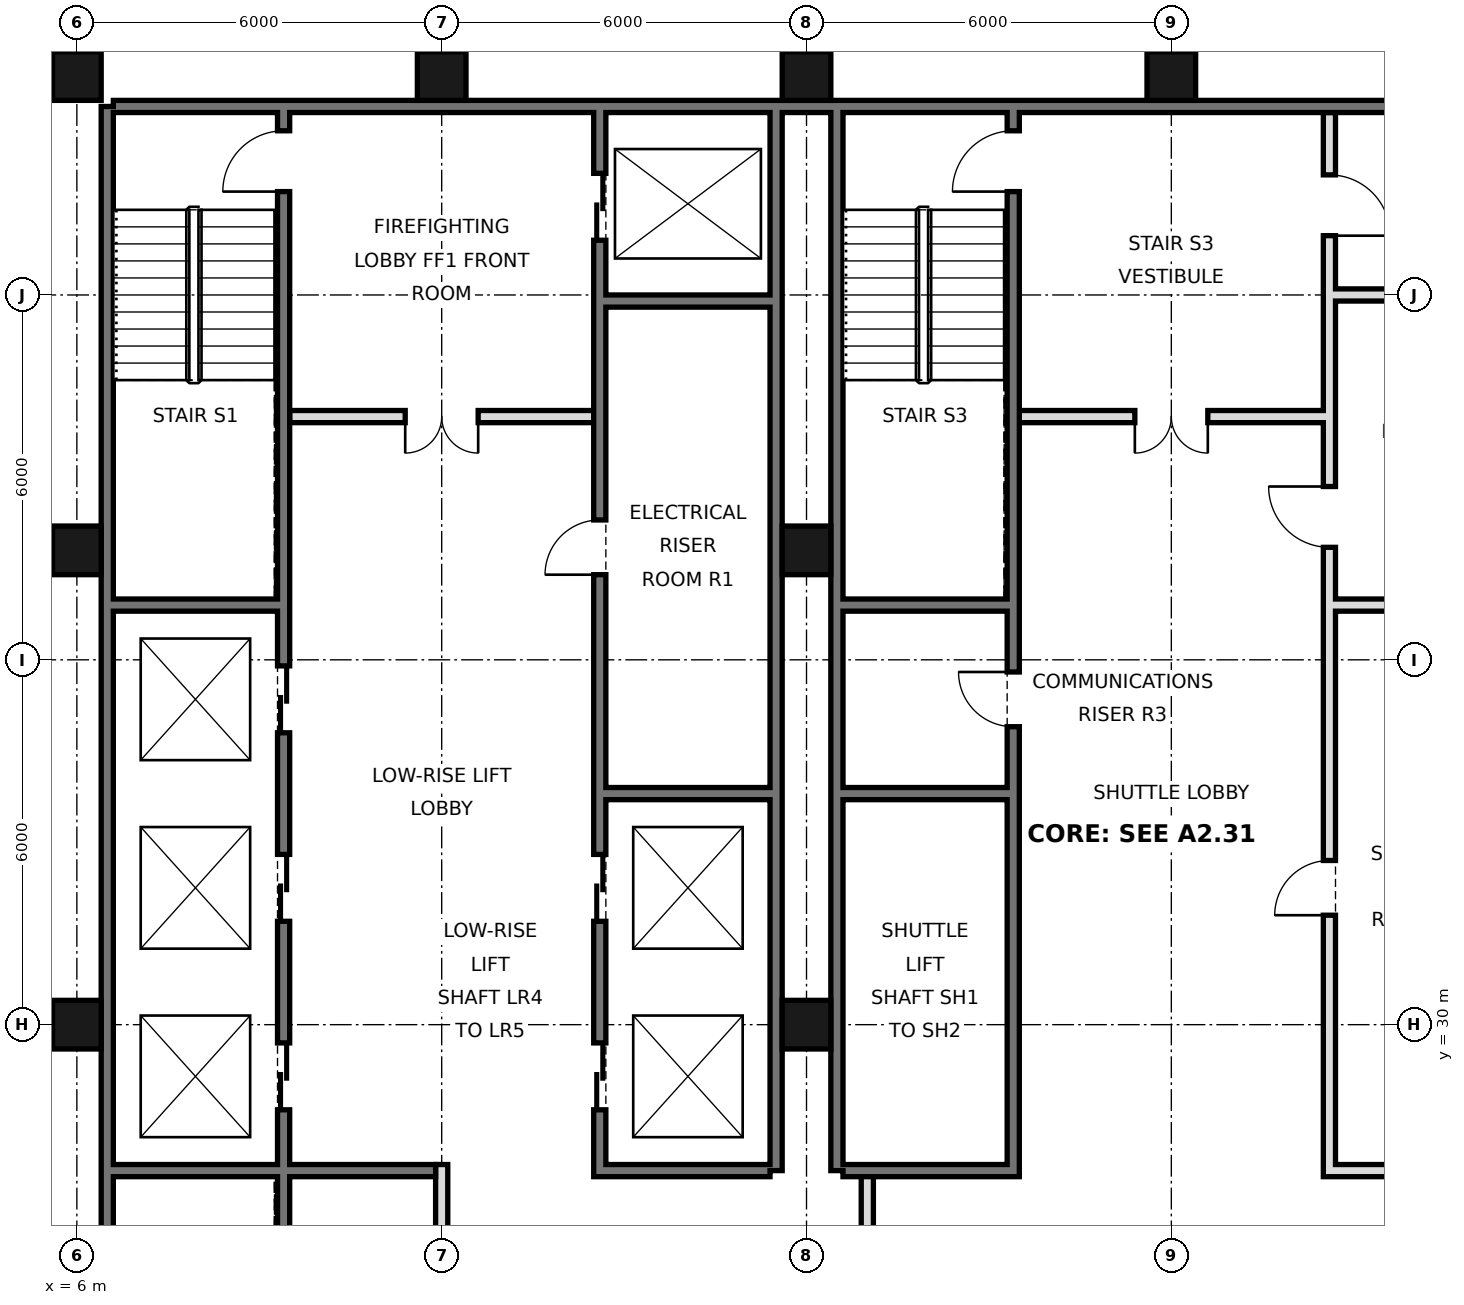
"""IFC4 building model, lengths in metres.
Left out: names, types, materials, properties, quantities, classifications, styles, units other than length and angle.
Written with IfcOpenShell. Run it as: python <this file> out.ifc"""

import sys

from ifc_helpers import new_model, si_unit, direction, frame, frame_2d, origin, origin_2d, place, context, subcontext, project, spatial, rectangle, hollow_rectangle, extrude, element, fill, save


model = new_model("IFC4")
c1 = context("Model", 3, precision=1e-05, world=origin(), true_north=direction((0.0, 1.0)))
c2 = subcontext(c1, "Body", "Model", "MODEL_VIEW")
j1 = project(units=[si_unit("LENGTHUNIT", "METRE"), si_unit("PLANEANGLEUNIT", "RADIAN")], contexts=[c1])
p1 = place(None, origin())
s1 = spatial("IfcSite", under=j1, at=p1, CompositionType="ELEMENT")
p2 = place(p1, origin())
s2 = spatial("IfcBuilding", under=s1, at=p2, CompositionType="ELEMENT")
p3 = place(p2, frame((0.0, 0.0, 123.2)))
s3 = spatial("IfcBuildingStorey", under=s2, at=p3, CompositionType="ELEMENT", Elevation=123.2)
for number, where, z_axis, x_axis in (
    (1, (6.0, 30.0, 0.0), (0.0, 0.0, 1.0), (1.0, 0.0, 0.0)),
    (2, (6.0, 37.8, 0.0), (0.0, 0.0, 1.0), (1.0, 0.0, 0.0)),
    (3, (6.0, 45.6, 0.0), (0.0, 0.0, 1.0), (1.0, 0.0, 0.0)),
    (4, (12.0, 45.6, 0.0), (0.0, 0.0, 1.0), (1.0, 0.0, 0.0)),
    (5, (18.0, 30.0, 0.0), (0.0, 0.0, 1.0), (1.0, 0.0, 0.0)),
    (6, (18.0, 37.8, 0.0), (0.0, 0.0, 1.0), (1.0, 0.0, 0.0)),
    (7, (18.0, 45.6, 0.0), (0.0, 0.0, 1.0), (1.0, 0.0, 0.0)),
    (8, (24.0, 45.6, 0.0), (0.0, 0.0, 1.0), (1.0, 0.0, 0.0)),
):
    element("IfcColumn", number, at=place(p3, frame(where, z_axis=z_axis, x_axis=x_axis)), inside=s3, PredefinedType="COLUMN", context=c2, shape_type="SweptSolid", body=[
        extrude(hollow_rectangle(XDim=0.8, YDim=0.8, WallThickness=0.05, at=origin_2d()), origin(), (0.0, 0.0, 1.0), 3.6),
    ])
p4 = place(p3, frame((6.5, 21.6, 0.0), z_axis=(0.0, 0.0, 1.0), x_axis=(0.0, 1.0, 0.0)))
e9 = element("IfcWall", 9, at=p4, inside=s3, PredefinedType="SOLIDWALL", context=c2, shape_type="SweptSolid", body=[
    extrude(rectangle(XDim=23.5, YDim=0.2, at=frame_2d((11.75, 0.0))), origin(), (0.0, 0.0, 1.0), 3.42),
])
p5 = place(p3, frame((6.6, 45.1, 0.0), z_axis=(0.0, 0.0, 1.0), x_axis=(1.0, 0.0, 0.0)))
e10 = element("IfcWall", 10, at=p5, inside=s3, PredefinedType="SOLIDWALL", context=c2, shape_type="SweptSolid", body=[
    extrude(rectangle(XDim=34.8, YDim=0.2, at=frame_2d((17.4, 0.0))), origin(), (0.0, 0.0, 1.0), 3.42),
])
for number, where, z_axis, x_axis in (
    (11, (17.5, 27.6, 0.0), (0.0, 0.0, 1.0), (0.0, 1.0, 0.0)),
    (12, (18.5, 27.6, 0.0), (0.0, 0.0, 1.0), (0.0, 1.0, 0.0)),
):
    element("IfcWall", number, at=place(p3, frame(where, z_axis=z_axis, x_axis=x_axis)), inside=s3, PredefinedType="SOLIDWALL", context=c2, shape_type="SweptSolid", body=[
        extrude(rectangle(XDim=17.5, YDim=0.2, at=frame_2d((8.75, 0.0))), origin(), (0.0, 0.0, 1.0), 3.42),
    ])
p6 = place(p3, frame((19.0, 21.6, 0.0), z_axis=(0.0, 0.0, 1.0), x_axis=(0.0, 1.0, 0.0)))
e13 = element("IfcWall", 13, at=p6, inside=s3, PredefinedType="PARTITIONING", context=c2, shape_type="SweptSolid", body=[
    extrude(rectangle(XDim=6.0, YDim=0.2, at=frame_2d((3.0, 0.0))), origin(), (0.0, 0.0, 1.0), 3.42),
])
p7 = place(p6, frame((2.1, 0.0, 0.0)))
e14 = element("IfcOpeningElement", 14, at=p7, cuts=e13, PredefinedType="OPENING", context=c2, shape_type="SweptSolid", body=[
    extrude(rectangle(XDim=1.8, YDim=2.1, at=frame_2d((0.9, 1.05))), frame((0.0, 0.11, 0.0), z_axis=(0.0, -1.0, 0.0), x_axis=(1.0, 0.0, 0.0)), (0.0, 0.0, 1.0), 0.22),
])
p8 = place(p3, frame((12.0, 21.6, 0.0), z_axis=(0.0, 0.0, 1.0), x_axis=(0.0, 1.0, 0.0)))
e15 = element("IfcWall", 15, at=p8, inside=s3, PredefinedType="PARTITIONING", context=c2, shape_type="SweptSolid", body=[
    extrude(rectangle(XDim=6.1, YDim=0.2, at=frame_2d((3.05, 0.0))), origin(), (0.0, 0.0, 1.0), 3.42),
])
p9 = place(p3, frame((14.6, 27.5, 0.0), z_axis=(0.0, 0.0, 1.0), x_axis=(0.0, 1.0, 0.0)))
e16 = element("IfcWall", 16, at=p9, inside=s3, PredefinedType="SOLIDWALL", context=c2, shape_type="SweptSolid", body=[
    extrude(rectangle(XDim=17.5, YDim=0.2, at=frame_2d((8.75, 0.0))), origin(), (0.0, 0.0, 1.0), 3.42),
])
p10 = place(p9, frame((1.1, 0.0, 0.0)))
e17 = element("IfcOpeningElement", 17, at=p10, cuts=e16, PredefinedType="OPENING", context=c2, shape_type="SweptSolid", body=[
    extrude(rectangle(XDim=1.1, YDim=2.1, at=frame_2d((0.55, 1.05))), frame((0.0, 0.11, 0.0), z_axis=(0.0, -1.0, 0.0), x_axis=(1.0, 0.0, 0.0)), (0.0, 0.0, 1.0), 0.22),
])
p11 = place(p9, frame((4.2, 0.0, 0.0)))
e18 = element("IfcOpeningElement", 18, at=p11, cuts=e16, PredefinedType="OPENING", context=c2, shape_type="SweptSolid", body=[
    extrude(rectangle(XDim=1.1, YDim=2.1, at=frame_2d((0.55, 1.05))), frame((0.0, 0.11, 0.0), z_axis=(0.0, -1.0, 0.0), x_axis=(1.0, 0.0, 0.0)), (0.0, 0.0, 1.0), 0.22),
])
p12 = place(p9, frame((15.4, 0.0, 0.0)))
e19 = element("IfcOpeningElement", 19, at=p12, cuts=e16, PredefinedType="OPENING", context=c2, shape_type="SweptSolid", body=[
    extrude(rectangle(XDim=1.1, YDim=2.1, at=frame_2d((0.55, 1.05))), frame((0.0, 0.11, 0.0), z_axis=(0.0, -1.0, 0.0), x_axis=(1.0, 0.0, 0.0)), (0.0, 0.0, 1.0), 0.22),
])
p13 = place(p9, frame((9.9, 0.0, 0.0)))
e20 = element("IfcOpeningElement", 20, at=p13, cuts=e16, PredefinedType="OPENING", context=c2, shape_type="SweptSolid", body=[
    extrude(rectangle(XDim=0.9, YDim=2.1, at=frame_2d((0.45, 1.05))), frame((0.0, 0.11, 0.0), z_axis=(0.0, -1.0, 0.0), x_axis=(1.0, 0.0, 0.0)), (0.0, 0.0, 1.0), 0.22),
])
p14 = place(p3, frame((21.4, 27.5, 0.0), z_axis=(0.0, 0.0, 1.0), x_axis=(0.0, 1.0, 0.0)))
e21 = element("IfcWall", 21, at=p14, inside=s3, PredefinedType="SOLIDWALL", context=c2, shape_type="SweptSolid", body=[
    extrude(rectangle(XDim=17.5, YDim=0.2, at=frame_2d((8.75, 0.0))), origin(), (0.0, 0.0, 1.0), 3.42),
])
p15 = place(p14, frame((16.2, 0.0, 0.0)))
e22 = element("IfcOpeningElement", 22, at=p15, cuts=e21, PredefinedType="OPENING", context=c2, shape_type="SweptSolid", body=[
    extrude(rectangle(XDim=1.0, YDim=2.1, at=frame_2d((0.5, 1.05))), frame((0.0, 0.11, 0.0), z_axis=(0.0, -1.0, 0.0), x_axis=(1.0, 0.0, 0.0)), (0.0, 0.0, 1.0), 0.22),
])
p16 = place(p14, frame((7.4, 0.0, 0.0)))
e23 = element("IfcOpeningElement", 23, at=p16, cuts=e21, PredefinedType="OPENING", context=c2, shape_type="SweptSolid", body=[
    extrude(rectangle(XDim=0.9, YDim=2.1, at=frame_2d((0.45, 1.05))), frame((0.0, 0.11, 0.0), z_axis=(0.0, -1.0, 0.0), x_axis=(1.0, 0.0, 0.0)), (0.0, 0.0, 1.0), 0.22),
])
p17 = place(p3, frame((26.6, 27.5, 0.0), z_axis=(0.0, 0.0, 1.0), x_axis=(0.0, 1.0, 0.0)))
e24 = element("IfcWall", 24, at=p17, inside=s3, PredefinedType="SOLIDWALL", context=c2, shape_type="SweptSolid", body=[
    extrude(rectangle(XDim=17.5, YDim=0.2, at=frame_2d((8.75, 0.0))), origin(), (0.0, 0.0, 1.0), 3.42),
])
p18 = place(p17, frame((4.3, 0.0, 0.0)))
e25 = element("IfcOpeningElement", 25, at=p18, cuts=e24, PredefinedType="OPENING", context=c2, shape_type="SweptSolid", body=[
    extrude(rectangle(XDim=0.9, YDim=2.1, at=frame_2d((0.45, 1.05))), frame((0.0, 0.11, 0.0), z_axis=(0.0, -1.0, 0.0), x_axis=(1.0, 0.0, 0.0)), (0.0, 0.0, 1.0), 0.22),
])
p19 = place(p17, frame((10.35, 0.0, 0.0)))
e26 = element("IfcOpeningElement", 26, at=p19, cuts=e24, PredefinedType="OPENING", context=c2, shape_type="SweptSolid", body=[
    extrude(rectangle(XDim=1.0, YDim=2.1, at=frame_2d((0.5, 1.05))), frame((0.0, 0.11, 0.0), z_axis=(0.0, -1.0, 0.0), x_axis=(1.0, 0.0, 0.0)), (0.0, 0.0, 1.0), 0.22),
])
p20 = place(p17, frame((15.475, 0.0, 0.0)))
e27 = element("IfcOpeningElement", 27, at=p20, cuts=e24, PredefinedType="OPENING", context=c2, shape_type="SweptSolid", body=[
    extrude(rectangle(XDim=1.0, YDim=2.1, at=frame_2d((0.5, 1.05))), frame((0.0, 0.11, 0.0), z_axis=(0.0, -1.0, 0.0), x_axis=(1.0, 0.0, 0.0)), (0.0, 0.0, 1.0), 0.22),
])
p21 = place(p3, frame((9.4, 21.6, 0.0), z_axis=(0.0, 0.0, 1.0), x_axis=(0.0, 1.0, 0.0)))
e28 = element("IfcWall", 28, at=p21, inside=s3, PredefinedType="SOLIDWALL", context=c2, shape_type="SweptSolid", body=[
    extrude(rectangle(XDim=23.4, YDim=0.2, at=frame_2d((11.7, 0.0))), origin(), (0.0, 0.0, 1.0), 3.42),
])
p22 = place(p21, frame((7.0, 0.0, 0.0)))
e29 = element("IfcOpeningElement", 29, at=p22, cuts=e28, PredefinedType="OPENING", context=c2, shape_type="SweptSolid", body=[
    extrude(rectangle(XDim=1.1, YDim=2.1, at=frame_2d((0.55, 1.05))), frame((0.0, 0.11, 0.0), z_axis=(0.0, -1.0, 0.0), x_axis=(1.0, 0.0, 0.0)), (0.0, 0.0, 1.0), 0.22),
])
p23 = place(p21, frame((10.1, 0.0, 0.0)))
e30 = element("IfcOpeningElement", 30, at=p23, cuts=e28, PredefinedType="OPENING", context=c2, shape_type="SweptSolid", body=[
    extrude(rectangle(XDim=1.1, YDim=2.1, at=frame_2d((0.55, 1.05))), frame((0.0, 0.11, 0.0), z_axis=(0.0, -1.0, 0.0), x_axis=(1.0, 0.0, 0.0)), (0.0, 0.0, 1.0), 0.22),
])
p24 = place(p21, frame((13.2, 0.0, 0.0)))
e31 = element("IfcOpeningElement", 31, at=p24, cuts=e28, PredefinedType="OPENING", context=c2, shape_type="SweptSolid", body=[
    extrude(rectangle(XDim=1.1, YDim=2.1, at=frame_2d((0.55, 1.05))), frame((0.0, 0.11, 0.0), z_axis=(0.0, -1.0, 0.0), x_axis=(1.0, 0.0, 0.0)), (0.0, 0.0, 1.0), 0.22),
])
p25 = place(p21, frame((22.1, 0.0, 0.0)))
e32 = element("IfcOpeningElement", 32, at=p25, cuts=e28, PredefinedType="OPENING", context=c2, shape_type="SweptSolid", body=[
    extrude(rectangle(XDim=1.0, YDim=2.1, at=frame_2d((0.5, 1.05))), frame((0.0, 0.11, 0.0), z_axis=(0.0, -1.0, 0.0), x_axis=(1.0, 0.0, 0.0)), (0.0, 0.0, 1.0), 0.22),
])
p26 = place(p21, frame((0.175, 0.0, 0.0)))
e33 = element("IfcOpeningElement", 33, at=p26, cuts=e28, PredefinedType="OPENING", context=c2, shape_type="SweptSolid", body=[
    extrude(rectangle(XDim=0.9, YDim=2.1, at=frame_2d((0.45, 1.05))), frame((0.0, 0.11, 0.0), z_axis=(0.0, -1.0, 0.0), x_axis=(1.0, 0.0, 0.0)), (0.0, 0.0, 1.0), 0.22),
])
for number, where, z_axis, x_axis in (
    (34, (14.7, 27.6, 0.0), (0.0, 0.0, 1.0), (1.0, 0.0, 0.0)),
    (35, (18.6, 27.6, 0.0), (0.0, 0.0, 1.0), (1.0, 0.0, 0.0)),
    (36, (26.7, 27.6, 0.0), (0.0, 0.0, 1.0), (1.0, 0.0, 0.0)),
):
    element("IfcWall", number, at=place(p3, frame(where, z_axis=z_axis, x_axis=x_axis)), inside=s3, PredefinedType="SOLIDWALL", context=c2, shape_type="SweptSolid", body=[
        extrude(rectangle(XDim=2.7, YDim=0.2, at=frame_2d((1.35, 0.0))), origin(), (0.0, 0.0, 1.0), 3.42),
    ])
p27 = place(p3, frame((6.6, 27.6, 0.0), z_axis=(0.0, 0.0, 1.0), x_axis=(1.0, 0.0, 0.0)))
e37 = element("IfcWall", 37, at=p27, inside=s3, PredefinedType="SOLIDWALL", context=c2, shape_type="SweptSolid", body=[
    extrude(rectangle(XDim=5.3, YDim=0.2, at=frame_2d((2.65, 0.0))), origin(), (0.0, 0.0, 1.0), 3.42),
])
for number, where, z_axis, x_axis in (
    (38, (14.7, 33.8, 0.0), (0.0, 0.0, 1.0), (1.0, 0.0, 0.0)),
    (39, (18.6, 33.8, 0.0), (0.0, 0.0, 1.0), (1.0, 0.0, 0.0)),
    (40, (18.6, 36.9, 0.0), (0.0, 0.0, 1.0), (1.0, 0.0, 0.0)),
    (41, (26.7, 36.9, 0.0), (0.0, 0.0, 1.0), (1.0, 0.0, 0.0)),
    (42, (6.6, 36.9, 0.0), (0.0, 0.0, 1.0), (1.0, 0.0, 0.0)),
):
    element("IfcWall", number, at=place(p3, frame(where, z_axis=z_axis, x_axis=x_axis)), inside=s3, PredefinedType="SOLIDWALL", context=c2, shape_type="SweptSolid", body=[
        extrude(rectangle(XDim=2.7, YDim=0.2, at=frame_2d((1.35, 0.0))), origin(), (0.0, 0.0, 1.0), 3.42),
    ])
p28 = place(p3, frame((21.5, 40.0, 0.0), z_axis=(0.0, 0.0, 1.0), x_axis=(1.0, 0.0, 0.0)))
e43 = element("IfcWall", 43, at=p28, inside=s3, PredefinedType="PARTITIONING", context=c2, shape_type="SweptSolid", body=[
    extrude(rectangle(XDim=5.0, YDim=0.2, at=frame_2d((2.5, 0.0))), origin(), (0.0, 0.0, 1.0), 3.42),
])
p29 = place(p28, frame((1.9, 0.0, 0.0)))
e44 = element("IfcOpeningElement", 44, at=p29, cuts=e43, PredefinedType="OPENING", context=c2, shape_type="SweptSolid", body=[
    extrude(rectangle(XDim=1.2, YDim=2.1, at=frame_2d((0.6, 1.05))), frame((0.0, 0.11, 0.0), z_axis=(0.0, -1.0, 0.0), x_axis=(1.0, 0.0, 0.0)), (0.0, 0.0, 1.0), 0.22),
])
p30 = place(p3, frame((9.5, 40.0, 0.0), z_axis=(0.0, 0.0, 1.0), x_axis=(1.0, 0.0, 0.0)))
e45 = element("IfcWall", 45, at=p30, inside=s3, PredefinedType="PARTITIONING", context=c2, shape_type="SweptSolid", body=[
    extrude(rectangle(XDim=5.0, YDim=0.2, at=frame_2d((2.5, 0.0))), origin(), (0.0, 0.0, 1.0), 3.42),
])
p31 = place(p30, frame((1.9, 0.0, 0.0)))
e46 = element("IfcOpeningElement", 46, at=p31, cuts=e45, PredefinedType="OPENING", context=c2, shape_type="SweptSolid", body=[
    extrude(rectangle(XDim=1.2, YDim=2.1, at=frame_2d((0.6, 1.05))), frame((0.0, 0.11, 0.0), z_axis=(0.0, -1.0, 0.0), x_axis=(1.0, 0.0, 0.0)), (0.0, 0.0, 1.0), 0.22),
])
p32 = place(p3, frame((14.7, 41.9, 0.0), z_axis=(0.0, 0.0, 1.0), x_axis=(1.0, 0.0, 0.0)))
e47 = element("IfcWall", 47, at=p32, inside=s3, PredefinedType="SOLIDWALL", context=c2, shape_type="SweptSolid", body=[
    extrude(rectangle(XDim=2.7, YDim=0.2, at=frame_2d((1.35, 0.0))), origin(), (0.0, 0.0, 1.0), 3.42),
])
p33 = place(p3, frame((26.7, 42.0, 0.0), z_axis=(0.0, 0.0, 1.0), x_axis=(1.0, 0.0, 0.0)))
e48 = element("IfcWall", 48, at=p33, inside=s3, PredefinedType="PARTITIONING", context=c2, shape_type="SweptSolid", body=[
    extrude(rectangle(XDim=2.7, YDim=0.2, at=frame_2d((1.35, 0.0))), origin(), (0.0, 0.0, 1.0), 3.42),
])
p34 = place(p31, frame((1.2, 0.0, 0.0), z_axis=(0.0, 0.0, 1.0), x_axis=(-1.0, 0.0, 0.0)))
e49 = element("IfcDoor", 49, at=p34, inside=s3, OperationType="DOUBLE_DOOR_SINGLE_SWING", PredefinedType="DOOR", context=c2, shape_type="SweptSolid", body=[
    extrude(rectangle(XDim=1.2, YDim=2.1, at=frame_2d((0.6, 1.05))), frame((0.0, 0.025, 0.0), z_axis=(0.0, -1.0, 0.0), x_axis=(1.0, 0.0, 0.0)), (0.0, 0.0, 1.0), 0.05),
])
fill(e46, e49)
p35 = place(p29, frame((1.2, 0.0, 0.0), z_axis=(0.0, 0.0, 1.0), x_axis=(-1.0, 0.0, 0.0)))
e50 = element("IfcDoor", 50, at=p35, inside=s3, OperationType="DOUBLE_DOOR_SINGLE_SWING", PredefinedType="DOOR", context=c2, shape_type="SweptSolid", body=[
    extrude(rectangle(XDim=1.2, YDim=2.1, at=frame_2d((0.6, 1.05))), frame((0.0, 0.025, 0.0), z_axis=(0.0, -1.0, 0.0), x_axis=(1.0, 0.0, 0.0)), (0.0, 0.0, 1.0), 0.05),
])
fill(e44, e50)
p36 = place(p10, origin())
e51 = element("IfcDoor", 51, at=p36, inside=s3, OperationType="DOUBLE_DOOR_SLIDING", PredefinedType="DOOR", context=c2, shape_type="SweptSolid", body=[
    extrude(rectangle(XDim=1.1, YDim=2.1, at=frame_2d((0.55, 1.05))), frame((0.0, 0.025, 0.0), z_axis=(0.0, -1.0, 0.0), x_axis=(1.0, 0.0, 0.0)), (0.0, 0.0, 1.0), 0.05),
])
fill(e17, e51)
p37 = place(p11, origin())
e52 = element("IfcDoor", 52, at=p37, inside=s3, OperationType="DOUBLE_DOOR_SLIDING", PredefinedType="DOOR", context=c2, shape_type="SweptSolid", body=[
    extrude(rectangle(XDim=1.1, YDim=2.1, at=frame_2d((0.55, 1.05))), frame((0.0, 0.025, 0.0), z_axis=(0.0, -1.0, 0.0), x_axis=(1.0, 0.0, 0.0)), (0.0, 0.0, 1.0), 0.05),
])
fill(e18, e52)
p38 = place(p12, origin())
e53 = element("IfcDoor", 53, at=p38, inside=s3, OperationType="DOUBLE_DOOR_SLIDING", PredefinedType="DOOR", context=c2, shape_type="SweptSolid", body=[
    extrude(rectangle(XDim=1.1, YDim=2.1, at=frame_2d((0.55, 1.05))), frame((0.0, 0.025, 0.0), z_axis=(0.0, -1.0, 0.0), x_axis=(1.0, 0.0, 0.0)), (0.0, 0.0, 1.0), 0.05),
])
fill(e19, e53)
p39 = place(p22, origin())
e54 = element("IfcDoor", 54, at=p39, inside=s3, OperationType="DOUBLE_DOOR_SLIDING", PredefinedType="DOOR", context=c2, shape_type="SweptSolid", body=[
    extrude(rectangle(XDim=1.1, YDim=2.1, at=frame_2d((0.55, 1.05))), frame((0.0, 0.025, 0.0), z_axis=(0.0, -1.0, 0.0), x_axis=(1.0, 0.0, 0.0)), (0.0, 0.0, 1.0), 0.05),
])
fill(e29, e54)
p40 = place(p23, origin())
e55 = element("IfcDoor", 55, at=p40, inside=s3, OperationType="DOUBLE_DOOR_SLIDING", PredefinedType="DOOR", context=c2, shape_type="SweptSolid", body=[
    extrude(rectangle(XDim=1.1, YDim=2.1, at=frame_2d((0.55, 1.05))), frame((0.0, 0.025, 0.0), z_axis=(0.0, -1.0, 0.0), x_axis=(1.0, 0.0, 0.0)), (0.0, 0.0, 1.0), 0.05),
])
fill(e30, e55)
p41 = place(p24, origin())
e56 = element("IfcDoor", 56, at=p41, inside=s3, OperationType="DOUBLE_DOOR_SLIDING", PredefinedType="DOOR", context=c2, shape_type="SweptSolid", body=[
    extrude(rectangle(XDim=1.1, YDim=2.1, at=frame_2d((0.55, 1.05))), frame((0.0, 0.025, 0.0), z_axis=(0.0, -1.0, 0.0), x_axis=(1.0, 0.0, 0.0)), (0.0, 0.0, 1.0), 0.05),
])
fill(e31, e56)
p42 = place(p25, origin())
e57 = element("IfcDoor", 57, at=p42, inside=s3, OperationType="SINGLE_SWING_LEFT", PredefinedType="DOOR", context=c2, shape_type="SweptSolid", body=[
    extrude(rectangle(XDim=1.0, YDim=2.1, at=frame_2d((0.5, 1.05))), frame((0.0, 0.025, 0.0), z_axis=(0.0, -1.0, 0.0), x_axis=(1.0, 0.0, 0.0)), (0.0, 0.0, 1.0), 0.05),
])
fill(e32, e57)
p43 = place(p15, origin())
e58 = element("IfcDoor", 58, at=p43, inside=s3, OperationType="SINGLE_SWING_LEFT", PredefinedType="DOOR", context=c2, shape_type="SweptSolid", body=[
    extrude(rectangle(XDim=1.0, YDim=2.1, at=frame_2d((0.5, 1.05))), frame((0.0, 0.025, 0.0), z_axis=(0.0, -1.0, 0.0), x_axis=(1.0, 0.0, 0.0)), (0.0, 0.0, 1.0), 0.05),
])
fill(e22, e58)
p44 = place(p13, origin())
e59 = element("IfcDoor", 59, at=p44, inside=s3, OperationType="SINGLE_SWING_LEFT", PredefinedType="DOOR", context=c2, shape_type="SweptSolid", body=[
    extrude(rectangle(XDim=0.9, YDim=2.1, at=frame_2d((0.45, 1.05))), frame((0.0, 0.025, 0.0), z_axis=(0.0, -1.0, 0.0), x_axis=(1.0, 0.0, 0.0)), (0.0, 0.0, 1.0), 0.05),
])
fill(e20, e59)
p45 = place(p16, frame((0.9, 0.0, 0.0), z_axis=(0.0, 0.0, 1.0), x_axis=(-1.0, 0.0, 0.0)))
e60 = element("IfcDoor", 60, at=p45, inside=s3, OperationType="SINGLE_SWING_LEFT", PredefinedType="DOOR", context=c2, shape_type="SweptSolid", body=[
    extrude(rectangle(XDim=0.9, YDim=2.1, at=frame_2d((0.45, 1.05))), frame((0.0, 0.025, 0.0), z_axis=(0.0, -1.0, 0.0), x_axis=(1.0, 0.0, 0.0)), (0.0, 0.0, 1.0), 0.05),
])
fill(e23, e60)
p46 = place(p18, origin())
e61 = element("IfcDoor", 61, at=p46, inside=s3, OperationType="SINGLE_SWING_LEFT", PredefinedType="DOOR", context=c2, shape_type="SweptSolid", body=[
    extrude(rectangle(XDim=0.9, YDim=2.1, at=frame_2d((0.45, 1.05))), frame((0.0, 0.025, 0.0), z_axis=(0.0, -1.0, 0.0), x_axis=(1.0, 0.0, 0.0)), (0.0, 0.0, 1.0), 0.05),
])
fill(e25, e61)
p47 = place(p19, frame((1.0, 0.0, 0.0), z_axis=(0.0, 0.0, 1.0), x_axis=(-1.0, 0.0, 0.0)))
e62 = element("IfcDoor", 62, at=p47, inside=s3, OperationType="SINGLE_SWING_LEFT", PredefinedType="DOOR", context=c2, shape_type="SweptSolid", body=[
    extrude(rectangle(XDim=1.0, YDim=2.1, at=frame_2d((0.5, 1.05))), frame((0.0, 0.025, 0.0), z_axis=(0.0, -1.0, 0.0), x_axis=(1.0, 0.0, 0.0)), (0.0, 0.0, 1.0), 0.05),
])
fill(e26, e62)
p48 = place(p20, frame((1.0, 0.0, 0.0), z_axis=(0.0, 0.0, 1.0), x_axis=(-1.0, 0.0, 0.0)))
e63 = element("IfcDoor", 63, at=p48, inside=s3, OperationType="SINGLE_SWING_RIGHT", PredefinedType="DOOR", context=c2, shape_type="SweptSolid", body=[
    extrude(rectangle(XDim=1.0, YDim=2.1, at=frame_2d((0.5, 1.05))), frame((0.0, 0.025, 0.0), z_axis=(0.0, -1.0, 0.0), x_axis=(1.0, 0.0, 0.0)), (0.0, 0.0, 1.0), 0.05),
])
fill(e27, e63)
save(model, sys.argv[1])
